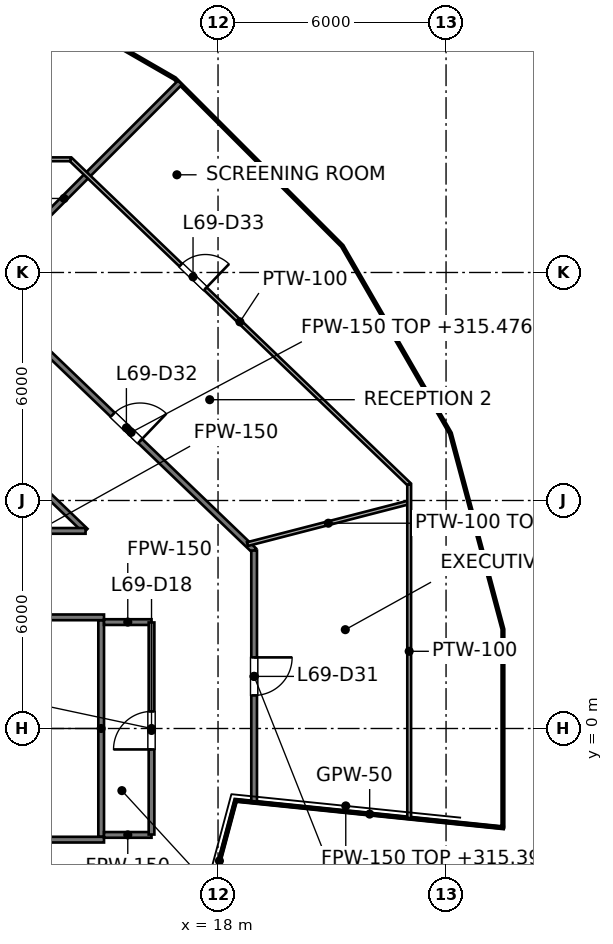
"""IFC4 building model, lengths in metres.
Left out: names, types, materials, properties, quantities, classifications, styles, units other than length and angle.
Written with IfcOpenShell. Run it as: python <this file> out.ifc"""

import sys

from ifc_helpers import new_model, si_unit, direction, frame, frame_2d, origin, place, context, subcontext, project, spatial, rectangle, extrude, element, fill, save


model = new_model("IFC4")
c1 = context("Model", 3, precision=1e-05, world=origin(), true_north=direction((0.0, 1.0)))
c2 = subcontext(c1, "Body", "Model", "MODEL_VIEW")
j1 = project(units=[si_unit("LENGTHUNIT", "METRE"), si_unit("PLANEANGLEUNIT", "RADIAN")], contexts=[c1])
p1 = place(None, origin())
s1 = spatial("IfcSite", under=j1, at=p1, CompositionType="ELEMENT")
p2 = place(p1, origin())
s2 = spatial("IfcBuilding", under=s1, at=p2, CompositionType="ELEMENT")
p3 = place(p2, frame((0.0, 0.0, 312.4)))
s3 = spatial("IfcBuildingStorey", under=s2, at=p3, CompositionType="ELEMENT", Elevation=312.4)
p4 = place(p3, frame((14.925, -2.85, 0.0), z_axis=(0.0, 0.0, 1.0), x_axis=(0.0, 1.0, 0.0)))
e1 = element("IfcWall", 1, at=p4, inside=s3, PredefinedType="PARTITIONING", context=c2, shape_type="SweptSolid", body=[
    extrude(rectangle(XDim=5.7, YDim=0.15, at=frame_2d((2.85, 0.0))), origin(), (0.0, 0.0, 1.0), 2.995),
])
for number, where, z_axis, x_axis in (
    (2, (12.0, 2.925, 0.0), (0.0, 0.0, 1.0), (1.0, 0.0, 0.0)),
    (3, (12.0, -2.925, 0.0), (0.0, 0.0, 1.0), (1.0, 0.0, 0.0)),
):
    element("IfcWall", number, at=place(p3, frame(where, z_axis=z_axis, x_axis=x_axis)), inside=s3, PredefinedType="PARTITIONING", context=c2, shape_type="SweptSolid", body=[
        extrude(rectangle(XDim=3.0, YDim=0.15, at=frame_2d((1.5, 0.0))), origin(), (0.0, 0.0, 1.0), 3.076),
    ])
p5 = place(p3, frame((11.391, 8.199, 0.0), z_axis=(0.0, 0.0, 1.0), x_axis=(0.721311820102, -0.69261046641, 0.0)))
e4 = element("IfcWall", 4, at=p5, inside=s3, PredefinedType="PARTITIONING", context=c2, shape_type="SweptSolid", body=[
    extrude(rectangle(XDim=4.33, YDim=0.15, at=frame_2d((2.165, 0.0))), origin(), (0.0, 0.0, 1.0), 3.152),
])
p6 = place(p3, frame((12.478, 10.899, 0.0), z_axis=(0.0, 0.0, 1.0), x_axis=(0.721299239471, -0.692623568137, 0.0)))
e5 = element("IfcWall", 5, at=p6, inside=s3, PredefinedType="PARTITIONING", context=c2, shape_type="SweptSolid", body=[
    extrude(rectangle(XDim=8.974, YDim=0.15, at=frame_2d((4.487, 0.0))), origin(), (0.0, 0.0, 1.0), 3.076),
])
p7 = place(p6, frame((3.813, 0.0, 0.0)))
e6 = element("IfcOpeningElement", 6, at=p7, cuts=e5, PredefinedType="OPENING", context=c2, shape_type="SweptSolid", body=[
    extrude(rectangle(XDim=1.0, YDim=2.1, at=frame_2d((0.5, 1.05))), frame((0.0, 0.075, 0.0), z_axis=(0.0, -1.0, 0.0), x_axis=(1.0, 0.0, 0.0)), (0.0, 0.0, 1.0), 0.15),
])
for number, where, z_axis, x_axis in (
    (7, (15.0, -2.8, 0.0), (0.0, 0.0, 1.0), (1.0, 0.0, 0.0)),
    (8, (15.0, 2.8, 0.0), (0.0, 0.0, 1.0), (1.0, 0.0, 0.0)),
):
    element("IfcWall", number, at=place(p3, frame(where, z_axis=z_axis, x_axis=x_axis)), inside=s3, PredefinedType="PARTITIONING", context=c2, shape_type="SweptSolid", body=[
        extrude(rectangle(XDim=1.25, YDim=0.15, at=frame_2d((0.625, 0.0))), origin(), (0.0, 0.0, 1.0), 3.85),
    ])
p8 = place(p3, frame((12.0, 5.2, 0.0), z_axis=(0.0, 0.0, 1.0), x_axis=(1.0, 0.0, 0.0)))
e9 = element("IfcWall", 9, at=p8, inside=s3, PredefinedType="PARTITIONING", context=c2, shape_type="SweptSolid", body=[
    extrude(rectangle(XDim=2.514, YDim=0.15, at=frame_2d((1.257, 0.0))), origin(), (0.0, 0.0, 1.0), 3.85),
])
p9 = place(p3, frame((10.9, 10.899, 0.0), z_axis=(0.0, 0.0, 1.0), x_axis=(0.707106781187, 0.707106781187, 0.0)))
e10 = element("IfcWall", 10, at=p9, inside=s3, PredefinedType="PARTITIONING", context=c2, shape_type="SweptSolid", body=[
    extrude(rectangle(XDim=8.624, YDim=0.15, at=frame_2d((4.312, 0.0))), origin(), (0.0, 0.0, 1.0), 3.475),
])
p10 = place(p3, frame((18.95, -1.941, 0.0), z_axis=(0.0, 0.0, 1.0), x_axis=(0.0, 1.0, 0.0)))
e11 = element("IfcWall", 11, at=p10, inside=s3, PredefinedType="PARTITIONING", context=c2, shape_type="SweptSolid", body=[
    extrude(rectangle(XDim=6.624, YDim=0.15, at=frame_2d((3.312, 0.0))), origin(), (0.0, 0.0, 1.0), 2.995),
])
p11 = place(p10, frame((2.812, 0.0, 0.0)))
e12 = element("IfcOpeningElement", 12, at=p11, cuts=e11, PredefinedType="OPENING", context=c2, shape_type="SweptSolid", body=[
    extrude(rectangle(XDim=1.0, YDim=2.1, at=frame_2d((0.5, 1.05))), frame((0.0, 0.075, 0.0), z_axis=(0.0, -1.0, 0.0), x_axis=(1.0, 0.0, 0.0)), (0.0, 0.0, 1.0), 0.15),
])
p12 = place(p3, frame((16.25, -2.79, 0.0), z_axis=(0.0, 0.0, 1.0), x_axis=(0.0, 1.0, 0.0)))
e13 = element("IfcWall", 13, at=p12, inside=s3, PredefinedType="PARTITIONING", context=c2, shape_type="SweptSolid", body=[
    extrude(rectangle(XDim=5.58, YDim=0.15, at=frame_2d((2.79, 0.0))), origin(), (0.0, 0.0, 1.0), 2.995),
])
p13 = place(p12, frame((2.239, 0.0, 0.0)))
e14 = element("IfcOpeningElement", 14, at=p13, cuts=e13, PredefinedType="OPENING", context=c2, shape_type="SweptSolid", body=[
    extrude(rectangle(XDim=1.0, YDim=2.1, at=frame_2d((0.5, 1.05))), frame((0.0, 0.075, 0.0), z_axis=(0.0, -1.0, 0.0), x_axis=(1.0, 0.0, 0.0)), (0.0, 0.0, 1.0), 0.15),
])
p14 = place(p3, frame((18.463, -1.891, 0.0), z_axis=(0.0, 0.0, 1.0), x_axis=(0.994796749693, -0.101879471925, 0.0)))
e15 = element("IfcWall", 15, at=p14, inside=s3, PredefinedType="PARTITIONING", context=c2, shape_type="SweptSolid", body=[
    extrude(rectangle(XDim=7.091, YDim=0.05, at=frame_2d((3.545, 0.0))), origin(), (0.0, 0.0, 1.0), 3.076),
])
p15 = place(p3, frame((17.61, -5.075, 0.0), z_axis=(0.0, 0.0, 1.0), x_axis=(0.258727446254, 0.965950365472, 0.0)))
e16 = element("IfcWall", 16, at=p15, inside=s3, PredefinedType="PARTITIONING", context=c2, shape_type="SweptSolid", body=[
    extrude(rectangle(XDim=3.296, YDim=0.05, at=frame_2d((1.648, 0.0))), origin(), (0.0, 0.0, 1.0), 3.076),
])
p16 = place(p3, frame((14.12, 14.979, 0.0), z_axis=(0.0, 0.0, 1.0), x_axis=(0.721327687229, -0.69259394138, 0.0)))
e17 = element("IfcWall", 17, at=p16, inside=s3, PredefinedType="PARTITIONING", context=c2, shape_type="SweptSolid", body=[
    extrude(rectangle(XDim=12.354, YDim=0.1, at=frame_2d((6.177, 0.0))), origin(), (0.0, 0.0, 1.0), 2.995),
])
p17 = place(p16, frame((4.017, 0.0, 0.0)))
e18 = element("IfcOpeningElement", 18, at=p17, cuts=e17, PredefinedType="OPENING", context=c2, shape_type="SweptSolid", body=[
    extrude(rectangle(XDim=0.9, YDim=2.1, at=frame_2d((0.45, 1.05))), frame((0.0, 0.05, 0.0), z_axis=(0.0, -1.0, 0.0), x_axis=(1.0, 0.0, 0.0)), (0.0, 0.0, 1.0), 0.1),
])
p18 = place(p3, frame((-14.12, 14.979, 0.0), z_axis=(0.0, 0.0, 1.0), x_axis=(1.0, 0.0, 0.0)))
e19 = element("IfcWall", 19, at=p18, inside=s3, PredefinedType="PARTITIONING", context=c2, shape_type="SweptSolid", body=[
    extrude(rectangle(XDim=28.24, YDim=0.1, at=frame_2d((14.12, 0.0))), origin(), (0.0, 0.0, 1.0), 2.927),
])
p19 = place(p18, frame((10.903, 0.0, 0.0)))
e20 = element("IfcOpeningElement", 20, at=p19, cuts=e19, PredefinedType="OPENING", context=c2, shape_type="SweptSolid", body=[
    extrude(rectangle(XDim=1.8, YDim=2.1, at=frame_2d((0.9, 1.05))), frame((0.0, 0.05, 0.0), z_axis=(0.0, -1.0, 0.0), x_axis=(1.0, 0.0, 0.0)), (0.0, 0.0, 1.0), 0.1),
])
p20 = place(p3, frame((18.774, 4.852, 0.0), z_axis=(0.0, 0.0, 1.0), x_axis=(0.968194478258, 0.250198825478, 0.0)))
e21 = element("IfcWall", 21, at=p20, inside=s3, PredefinedType="PARTITIONING", context=c2, shape_type="SweptSolid", body=[
    extrude(rectangle(XDim=4.396, YDim=0.1, at=frame_2d((2.198, 0.0))), origin(), (0.0, 0.0, 1.0), 3.85),
])
p21 = place(p3, frame((23.03, -2.358, 0.0), z_axis=(0.0, 0.0, 1.0), x_axis=(0.0, 1.0, 0.0)))
e22 = element("IfcWall", 22, at=p21, inside=s3, PredefinedType="PARTITIONING", context=c2, shape_type="SweptSolid", body=[
    extrude(rectangle(XDim=8.779, YDim=0.1, at=frame_2d((4.389, 0.0))), origin(), (0.0, 0.0, 1.0), 2.995),
])
p22 = place(p13, origin())
e23 = element("IfcDoor", 23, at=p22, inside=s3, OperationType="SINGLE_SWING_LEFT", PredefinedType="DOOR", context=c2, shape_type="SweptSolid", body=[
    extrude(rectangle(XDim=1.0, YDim=2.1, at=frame_2d((0.5, 1.05))), frame((0.0, 0.025, 0.0), z_axis=(0.0, -1.0, 0.0), x_axis=(1.0, 0.0, 0.0)), (0.0, 0.0, 1.0), 0.05),
])
fill(e14, e23)
p23 = place(p11, origin())
e24 = element("IfcDoor", 24, at=p23, inside=s3, OperationType="SINGLE_SWING_RIGHT", PredefinedType="DOOR", context=c2, shape_type="SweptSolid", body=[
    extrude(rectangle(XDim=1.0, YDim=2.1, at=frame_2d((0.5, 1.05))), frame((0.0, 0.025, 0.0), z_axis=(0.0, -1.0, 0.0), x_axis=(1.0, 0.0, 0.0)), (0.0, 0.0, 1.0), 0.05),
])
fill(e12, e24)
p24 = place(p7, origin())
e25 = element("IfcDoor", 25, at=p24, inside=s3, OperationType="SINGLE_SWING_RIGHT", PredefinedType="DOOR", context=c2, shape_type="SweptSolid", body=[
    extrude(rectangle(XDim=1.0, YDim=2.1, at=frame_2d((0.5, 1.05))), frame((0.0, 0.025, 0.0), z_axis=(0.0, -1.0, 0.0), x_axis=(1.0, 0.0, 0.0)), (0.0, 0.0, 1.0), 0.05),
])
fill(e6, e25)
p25 = place(p17, origin())
e26 = element("IfcDoor", 26, at=p25, inside=s3, OperationType="SINGLE_SWING_RIGHT", PredefinedType="DOOR", context=c2, shape_type="SweptSolid", body=[
    extrude(rectangle(XDim=0.9, YDim=2.1, at=frame_2d((0.45, 1.05))), frame((0.0, 0.025, 0.0), z_axis=(0.0, -1.0, 0.0), x_axis=(1.0, 0.0, 0.0)), (0.0, 0.0, 1.0), 0.05),
])
fill(e18, e26)
save(model, sys.argv[1])
